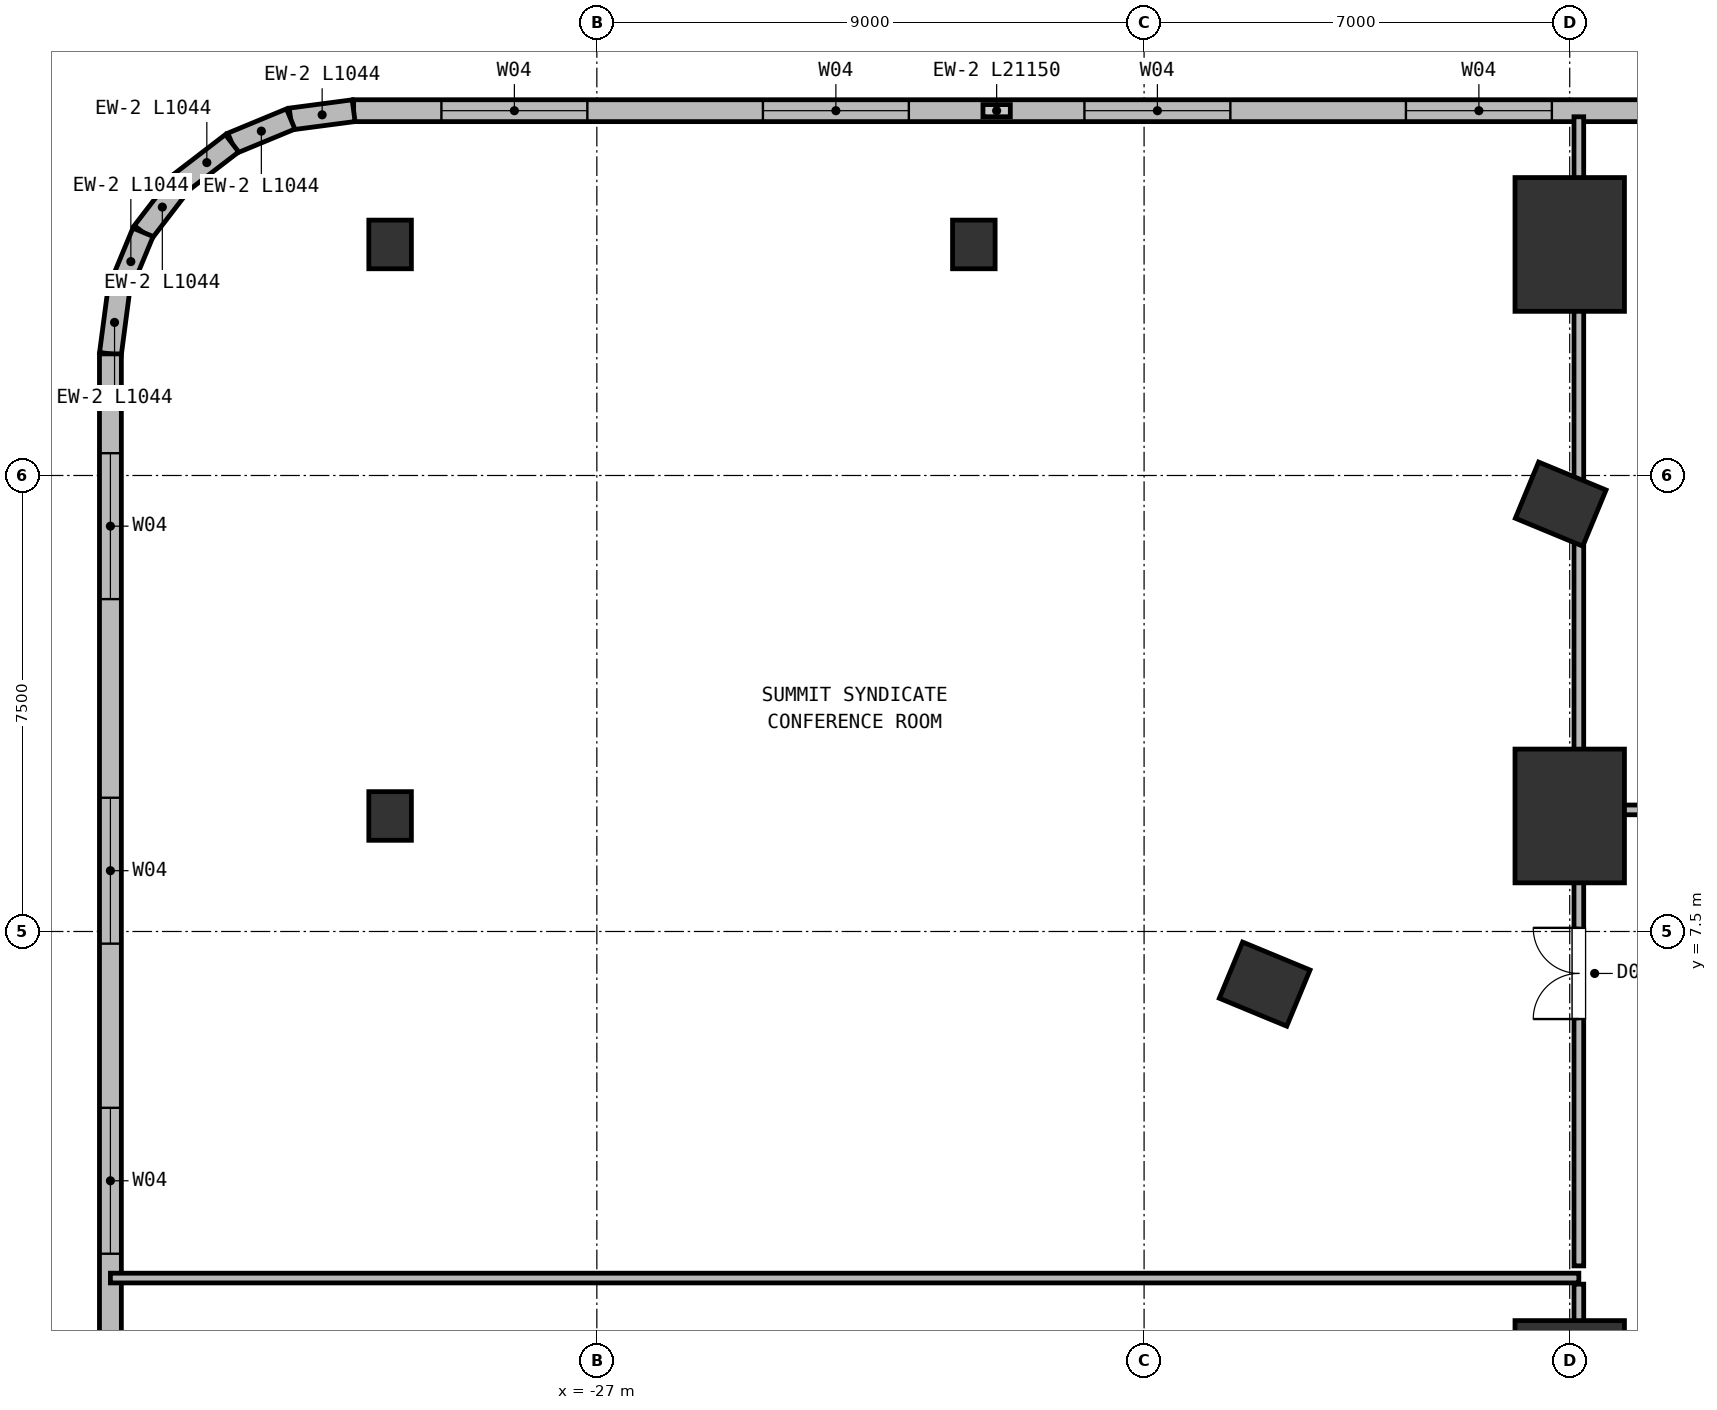
"""IFC4 building model, lengths in metres.
Left out: names, types, materials, properties, quantities, classifications, styles, units other than length and angle.
Written with IfcOpenShell. Run it as: python <this file> out.ifc"""

import sys

from ifc_helpers import new_model, si_unit, direction, frame, frame_2d, origin, origin_2d, place, context, subcontext, project, spatial, rectangle, extrude, element, fill, save


model = new_model("IFC4")
c1 = context("Model", 3, precision=1e-05, world=origin(), true_north=direction((0.0, 1.0)))
c2 = subcontext(c1, "Body", "Model", "MODEL_VIEW")
j1 = project(units=[si_unit("LENGTHUNIT", "METRE"), si_unit("PLANEANGLEUNIT", "RADIAN")], contexts=[c1])
p1 = place(None, origin())
s1 = spatial("IfcSite", under=j1, at=p1, CompositionType="ELEMENT")
p2 = place(p1, origin())
s2 = spatial("IfcBuilding", under=s1, at=p2, CompositionType="ELEMENT")
p3 = place(p2, frame((0.0, 0.0, 21.5)))
s3 = spatial("IfcBuildingStorey", under=s2, at=p3, CompositionType="ELEMENT", Elevation=21.5)
for number, where, z_axis, x_axis in (
    (1, (-11.148, 14.529, 0.0), (0.0, 0.0, 1.0), (0.383, 0.924, 0.0)),
    (2, (-16.017, 6.635, 0.0), (0.0, 0.0, 1.0), (0.383, 0.924, 0.0)),
):
    element("IfcColumn", number, at=place(p3, frame(where, z_axis=z_axis, x_axis=x_axis)), inside=s3, PredefinedType="COLUMN", context=c2, shape_type="SweptSolid", body=[
        extrude(rectangle(XDim=1.0, YDim=1.2, at=origin_2d()), origin(), (0.0, 0.0, 1.0), 4.5),
    ])
for number, where, z_axis, x_axis in (
    (3, (-30.4, 9.4, 0.0), (0.0, 0.0, 1.0), (1.0, 0.0, 0.0)),
    (4, (-30.4, 18.8, 0.0), (0.0, 0.0, 1.0), (1.0, 0.0, 0.0)),
    (5, (-20.8, 18.8, 0.0), (0.0, 0.0, 1.0), (1.0, 0.0, 0.0)),
):
    element("IfcColumn", number, at=place(p3, frame(where, z_axis=z_axis, x_axis=x_axis)), inside=s3, PredefinedType="COLUMN", context=c2, shape_type="SweptSolid", body=[
        extrude(rectangle(XDim=0.7, YDim=0.8, at=origin_2d()), origin(), (0.0, 0.0, 1.0), 4.5),
    ])
for number, where, z_axis, x_axis in (
    (6, (-11.0, 0.0, 0.0), (0.0, 0.0, 1.0), (1.0, 0.0, 0.0)),
    (7, (-11.0, 9.4, 0.0), (0.0, 0.0, 1.0), (1.0, 0.0, 0.0)),
    (8, (-11.0, 18.8, 0.0), (0.0, 0.0, 1.0), (1.0, 0.0, 0.0)),
):
    element("IfcColumn", number, at=place(p3, frame(where, z_axis=z_axis, x_axis=x_axis)), inside=s3, PredefinedType="COLUMN", context=c2, shape_type="SweptSolid", body=[
        extrude(rectangle(XDim=1.8, YDim=2.2, at=origin_2d()), origin(), (0.0, 0.0, 1.0), 4.5),
    ])
p4 = place(p3, frame((-31.0, 21.0, 0.0), z_axis=(0.0, 0.0, 1.0), x_axis=(1.0, 0.0, 0.0)))
e9 = element("IfcWall", 9, at=p4, inside=s3, PredefinedType="SOLIDWALL", context=c2, shape_type="SweptSolid", body=[
    extrude(rectangle(XDim=21.15, YDim=0.36, at=frame_2d((10.575, 0.0))), origin(), (0.0, 0.0, 1.0), 4.22),
])
p5 = place(p4, frame((1.444, 0.0, 0.95)))
e10 = element("IfcOpeningElement", 10, at=p5, cuts=e9, PredefinedType="OPENING", context=c2, shape_type="SweptSolid", body=[
    extrude(rectangle(XDim=2.4, YDim=2.6, at=frame_2d((1.2, 1.3))), frame((0.0, 0.19, 0.0), z_axis=(0.0, -1.0, 0.0), x_axis=(1.0, 0.0, 0.0)), (0.0, 0.0, 1.0), 0.38),
])
p6 = place(p4, frame((6.731, 0.0, 0.95)))
e11 = element("IfcOpeningElement", 11, at=p6, cuts=e9, PredefinedType="OPENING", context=c2, shape_type="SweptSolid", body=[
    extrude(rectangle(XDim=2.4, YDim=2.6, at=frame_2d((1.2, 1.3))), frame((0.0, 0.19, 0.0), z_axis=(0.0, -1.0, 0.0), x_axis=(1.0, 0.0, 0.0)), (0.0, 0.0, 1.0), 0.38),
])
p7 = place(p4, frame((12.019, 0.0, 0.95)))
e12 = element("IfcOpeningElement", 12, at=p7, cuts=e9, PredefinedType="OPENING", context=c2, shape_type="SweptSolid", body=[
    extrude(rectangle(XDim=2.4, YDim=2.6, at=frame_2d((1.2, 1.3))), frame((0.0, 0.19, 0.0), z_axis=(0.0, -1.0, 0.0), x_axis=(1.0, 0.0, 0.0)), (0.0, 0.0, 1.0), 0.38),
])
p8 = place(p4, frame((17.306, 0.0, 0.95)))
e13 = element("IfcOpeningElement", 13, at=p8, cuts=e9, PredefinedType="OPENING", context=c2, shape_type="SweptSolid", body=[
    extrude(rectangle(XDim=2.4, YDim=2.6, at=frame_2d((1.2, 1.3))), frame((0.0, 0.19, 0.0), z_axis=(0.0, -1.0, 0.0), x_axis=(1.0, 0.0, 0.0)), (0.0, 0.0, 1.0), 0.38),
])
p9 = place(p3, frame((-32.035, 20.864, 0.0), z_axis=(0.0, 0.0, 1.0), x_axis=(0.991455091231, 0.130448465198, 0.0)))
e14 = element("IfcWall", 14, at=p9, inside=s3, PredefinedType="SOLIDWALL", context=c2, shape_type="SweptSolid", body=[
    extrude(rectangle(XDim=1.044, YDim=0.36, at=frame_2d((0.522, 0.0))), origin(), (0.0, 0.0, 1.0), 4.22),
])
for number, where, z_axis, x_axis in (
    (15, (-33.0, 20.464, 0.0), (0.0, 0.0, 1.0), (0.924, 0.383, 0.0)),
    (16, (-33.828, 19.828, 0.0), (0.0, 0.0, 1.0), (0.793, 0.609, 0.0)),
    (17, (-34.464, 19.0, 0.0), (0.0, 0.0, 1.0), (0.609, 0.793, 0.0)),
    (18, (-34.864, 18.035, 0.0), (0.0, 0.0, 1.0), (0.383, 0.924, 0.0)),
):
    element("IfcWall", number, at=place(p3, frame(where, z_axis=z_axis, x_axis=x_axis)), inside=s3, PredefinedType="SOLIDWALL", context=c2, shape_type="SweptSolid", body=[
        extrude(rectangle(XDim=1.044, YDim=0.36, at=frame_2d((0.522, 0.0))), origin(), (0.0, 0.0, 1.0), 4.22),
    ])
p10 = place(p3, frame((-35.0, 17.0, 0.0), z_axis=(0.0, 0.0, 1.0), x_axis=(0.130448465198, 0.991455091231, 0.0)))
e19 = element("IfcWall", 19, at=p10, inside=s3, PredefinedType="SOLIDWALL", context=c2, shape_type="SweptSolid", body=[
    extrude(rectangle(XDim=1.044, YDim=0.36, at=frame_2d((0.522, 0.0))), origin(), (0.0, 0.0, 1.0), 4.22),
])
p11 = place(p3, frame((-35.0, -17.0, 0.0), z_axis=(0.0, 0.0, 1.0), x_axis=(0.0, 1.0, 0.0)))
e20 = element("IfcWall", 20, at=p11, inside=s3, PredefinedType="SOLIDWALL", context=c2, shape_type="SweptSolid", body=[
    extrude(rectangle(XDim=34.0, YDim=0.36, at=frame_2d((17.0, 0.0))), origin(), (0.0, 0.0, 1.0), 4.22),
])
p12 = place(p11, frame((1.633, 0.0, 0.95)))
e21 = element("IfcOpeningElement", 21, at=p12, cuts=e20, PredefinedType="OPENING", context=c2, shape_type="SweptSolid", body=[
    extrude(rectangle(XDim=2.4, YDim=2.6, at=frame_2d((1.2, 1.3))), frame((0.0, 0.19, 0.0), z_axis=(0.0, -1.0, 0.0), x_axis=(1.0, 0.0, 0.0)), (0.0, 0.0, 1.0), 0.38),
])
p13 = place(p11, frame((7.3, 0.0, 0.95)))
e22 = element("IfcOpeningElement", 22, at=p13, cuts=e20, PredefinedType="OPENING", context=c2, shape_type="SweptSolid", body=[
    extrude(rectangle(XDim=2.4, YDim=2.6, at=frame_2d((1.2, 1.3))), frame((0.0, 0.19, 0.0), z_axis=(0.0, -1.0, 0.0), x_axis=(1.0, 0.0, 0.0)), (0.0, 0.0, 1.0), 0.38),
])
p14 = place(p11, frame((12.967, 0.0, 0.95)))
e23 = element("IfcOpeningElement", 23, at=p14, cuts=e20, PredefinedType="OPENING", context=c2, shape_type="SweptSolid", body=[
    extrude(rectangle(XDim=2.4, YDim=2.6, at=frame_2d((1.2, 1.3))), frame((0.0, 0.19, 0.0), z_axis=(0.0, -1.0, 0.0), x_axis=(1.0, 0.0, 0.0)), (0.0, 0.0, 1.0), 0.38),
])
p15 = place(p11, frame((19.2, 0.0, 0.95)))
e24 = element("IfcOpeningElement", 24, at=p15, cuts=e20, PredefinedType="OPENING", context=c2, shape_type="SweptSolid", body=[
    extrude(rectangle(XDim=2.4, YDim=2.6, at=frame_2d((1.2, 1.3))), frame((0.0, 0.19, 0.0), z_axis=(0.0, -1.0, 0.0), x_axis=(1.0, 0.0, 0.0)), (0.0, 0.0, 1.0), 0.38),
])
p16 = place(p11, frame((24.3, 0.0, 0.95)))
e25 = element("IfcOpeningElement", 25, at=p16, cuts=e20, PredefinedType="OPENING", context=c2, shape_type="SweptSolid", body=[
    extrude(rectangle(XDim=2.4, YDim=2.6, at=frame_2d((1.2, 1.3))), frame((0.0, 0.19, 0.0), z_axis=(0.0, -1.0, 0.0), x_axis=(1.0, 0.0, 0.0)), (0.0, 0.0, 1.0), 0.38),
])
p17 = place(p11, frame((29.967, 0.0, 0.95)))
e26 = element("IfcOpeningElement", 26, at=p17, cuts=e20, PredefinedType="OPENING", context=c2, shape_type="SweptSolid", body=[
    extrude(rectangle(XDim=2.4, YDim=2.6, at=frame_2d((1.2, 1.3))), frame((0.0, 0.19, 0.0), z_axis=(0.0, -1.0, 0.0), x_axis=(1.0, 0.0, 0.0)), (0.0, 0.0, 1.0), 0.38),
])
p18 = place(p3, frame((-10.85, 1.8, 0.0), z_axis=(0.0, 0.0, 1.0), x_axis=(-1.0, 0.0, 0.0)))
e27 = element("IfcWall", 27, at=p18, inside=s3, PredefinedType="PARTITIONING", context=c2, shape_type="SweptSolid", body=[
    extrude(rectangle(XDim=24.15, YDim=0.16, at=frame_2d((12.075, 0.0))), origin(), (0.0, 0.0, 1.0), 4.22),
])
p19 = place(p3, frame((-10.85, -20.9, 0.0), z_axis=(0.0, 0.0, 1.0), x_axis=(0.0, 1.0, 0.0)))
e28 = element("IfcWall", 28, at=p19, inside=s3, PredefinedType="PARTITIONING", context=c2, shape_type="SweptSolid", body=[
    extrude(rectangle(XDim=22.6, YDim=0.16, at=frame_2d((11.3, 0.0))), origin(), (0.0, 0.0, 1.0), 3.6),
])
p20 = place(p19, frame((17.35, 0.0, 0.0)))
e29 = element("IfcOpeningElement", 29, at=p20, cuts=e28, PredefinedType="OPENING", context=c2, shape_type="SweptSolid", body=[
    extrude(rectangle(XDim=1.5, YDim=2.2, at=frame_2d((0.75, 1.1))), frame((0.0, 0.09, 0.0), z_axis=(0.0, -1.0, 0.0), x_axis=(1.0, 0.0, 0.0)), (0.0, 0.0, 1.0), 0.18),
])
p21 = place(p3, frame((-10.85, 2.0, 0.0), z_axis=(0.0, 0.0, 1.0), x_axis=(0.0, 1.0, 0.0)))
e30 = element("IfcWall", 30, at=p21, inside=s3, PredefinedType="PARTITIONING", context=c2, shape_type="SweptSolid", body=[
    extrude(rectangle(XDim=18.9, YDim=0.16, at=frame_2d((9.45, 0.0))), origin(), (0.0, 0.0, 1.0), 3.6),
])
p22 = place(p21, frame((4.06, 0.0, 0.0)))
e31 = element("IfcOpeningElement", 31, at=p22, cuts=e30, PredefinedType="OPENING", context=c2, shape_type="SweptSolid", body=[
    extrude(rectangle(XDim=1.5, YDim=2.2, at=frame_2d((0.75, 1.1))), frame((0.0, 0.09, 0.0), z_axis=(0.0, -1.0, 0.0), x_axis=(1.0, 0.0, 0.0)), (0.0, 0.0, 1.0), 0.18),
])
p23 = place(p3, frame((-10.75, 9.5, 0.0), z_axis=(0.0, 0.0, 1.0), x_axis=(1.0, 0.0, 0.0)))
e32 = element("IfcWall", 32, at=p23, inside=s3, PredefinedType="PARTITIONING", context=c2, shape_type="SweptSolid", body=[
    extrude(rectangle(XDim=19.5, YDim=0.16, at=frame_2d((9.75, 0.0))), origin(), (0.0, 0.0, 1.0), 3.3),
])
p24 = place(p23, frame((6.2, 0.0, 0.0)))
e33 = element("IfcOpeningElement", 33, at=p24, cuts=e32, PredefinedType="OPENING", context=c2, shape_type="SweptSolid", body=[
    extrude(rectangle(XDim=1.5, YDim=2.2, at=frame_2d((0.75, 1.1))), frame((0.0, 0.09, 0.0), z_axis=(0.0, -1.0, 0.0), x_axis=(1.0, 0.0, 0.0)), (0.0, 0.0, 1.0), 0.18),
])
p25 = place(p5, origin())
e34 = element("IfcWindow", 34, at=p25, inside=s3, PartitioningType="SINGLE_PANEL", PredefinedType="WINDOW", context=c2, shape_type="SweptSolid", body=[
    extrude(rectangle(XDim=2.4, YDim=2.6, at=frame_2d((1.2, 1.3))), frame((0.0, 0.03, 0.0), z_axis=(0.0, -1.0, 0.0), x_axis=(1.0, 0.0, 0.0)), (0.0, 0.0, 1.0), 0.06),
])
fill(e10, e34)
p26 = place(p6, origin())
e35 = element("IfcWindow", 35, at=p26, inside=s3, PartitioningType="SINGLE_PANEL", PredefinedType="WINDOW", context=c2, shape_type="SweptSolid", body=[
    extrude(rectangle(XDim=2.4, YDim=2.6, at=frame_2d((1.2, 1.3))), frame((0.0, 0.03, 0.0), z_axis=(0.0, -1.0, 0.0), x_axis=(1.0, 0.0, 0.0)), (0.0, 0.0, 1.0), 0.06),
])
fill(e11, e35)
p27 = place(p7, origin())
e36 = element("IfcWindow", 36, at=p27, inside=s3, PartitioningType="SINGLE_PANEL", PredefinedType="WINDOW", context=c2, shape_type="SweptSolid", body=[
    extrude(rectangle(XDim=2.4, YDim=2.6, at=frame_2d((1.2, 1.3))), frame((0.0, 0.03, 0.0), z_axis=(0.0, -1.0, 0.0), x_axis=(1.0, 0.0, 0.0)), (0.0, 0.0, 1.0), 0.06),
])
fill(e12, e36)
p28 = place(p8, origin())
e37 = element("IfcWindow", 37, at=p28, inside=s3, PartitioningType="SINGLE_PANEL", PredefinedType="WINDOW", context=c2, shape_type="SweptSolid", body=[
    extrude(rectangle(XDim=2.4, YDim=2.6, at=frame_2d((1.2, 1.3))), frame((0.0, 0.03, 0.0), z_axis=(0.0, -1.0, 0.0), x_axis=(1.0, 0.0, 0.0)), (0.0, 0.0, 1.0), 0.06),
])
fill(e13, e37)
p29 = place(p15, origin())
e38 = element("IfcWindow", 38, at=p29, inside=s3, PartitioningType="SINGLE_PANEL", PredefinedType="WINDOW", context=c2, shape_type="SweptSolid", body=[
    extrude(rectangle(XDim=2.4, YDim=2.6, at=frame_2d((1.2, 1.3))), frame((0.0, 0.03, 0.0), z_axis=(0.0, -1.0, 0.0), x_axis=(1.0, 0.0, 0.0)), (0.0, 0.0, 1.0), 0.06),
])
fill(e24, e38)
p30 = place(p16, origin())
e39 = element("IfcWindow", 39, at=p30, inside=s3, PartitioningType="SINGLE_PANEL", PredefinedType="WINDOW", context=c2, shape_type="SweptSolid", body=[
    extrude(rectangle(XDim=2.4, YDim=2.6, at=frame_2d((1.2, 1.3))), frame((0.0, 0.03, 0.0), z_axis=(0.0, -1.0, 0.0), x_axis=(1.0, 0.0, 0.0)), (0.0, 0.0, 1.0), 0.06),
])
fill(e25, e39)
p31 = place(p17, origin())
e40 = element("IfcWindow", 40, at=p31, inside=s3, PartitioningType="SINGLE_PANEL", PredefinedType="WINDOW", context=c2, shape_type="SweptSolid", body=[
    extrude(rectangle(XDim=2.4, YDim=2.6, at=frame_2d((1.2, 1.3))), frame((0.0, 0.03, 0.0), z_axis=(0.0, -1.0, 0.0), x_axis=(1.0, 0.0, 0.0)), (0.0, 0.0, 1.0), 0.06),
])
fill(e26, e40)
p32 = place(p22, origin())
e41 = element("IfcDoor", 41, at=p32, inside=s3, OperationType="DOUBLE_DOOR_SINGLE_SWING", PredefinedType="DOOR", context=c2, shape_type="SweptSolid", body=[
    extrude(rectangle(XDim=1.5, YDim=2.2, at=frame_2d((0.75, 1.1))), frame((0.0, 0.025, 0.0), z_axis=(0.0, -1.0, 0.0), x_axis=(1.0, 0.0, 0.0)), (0.0, 0.0, 1.0), 0.05),
])
fill(e31, e41)
save(model, sys.argv[1])
